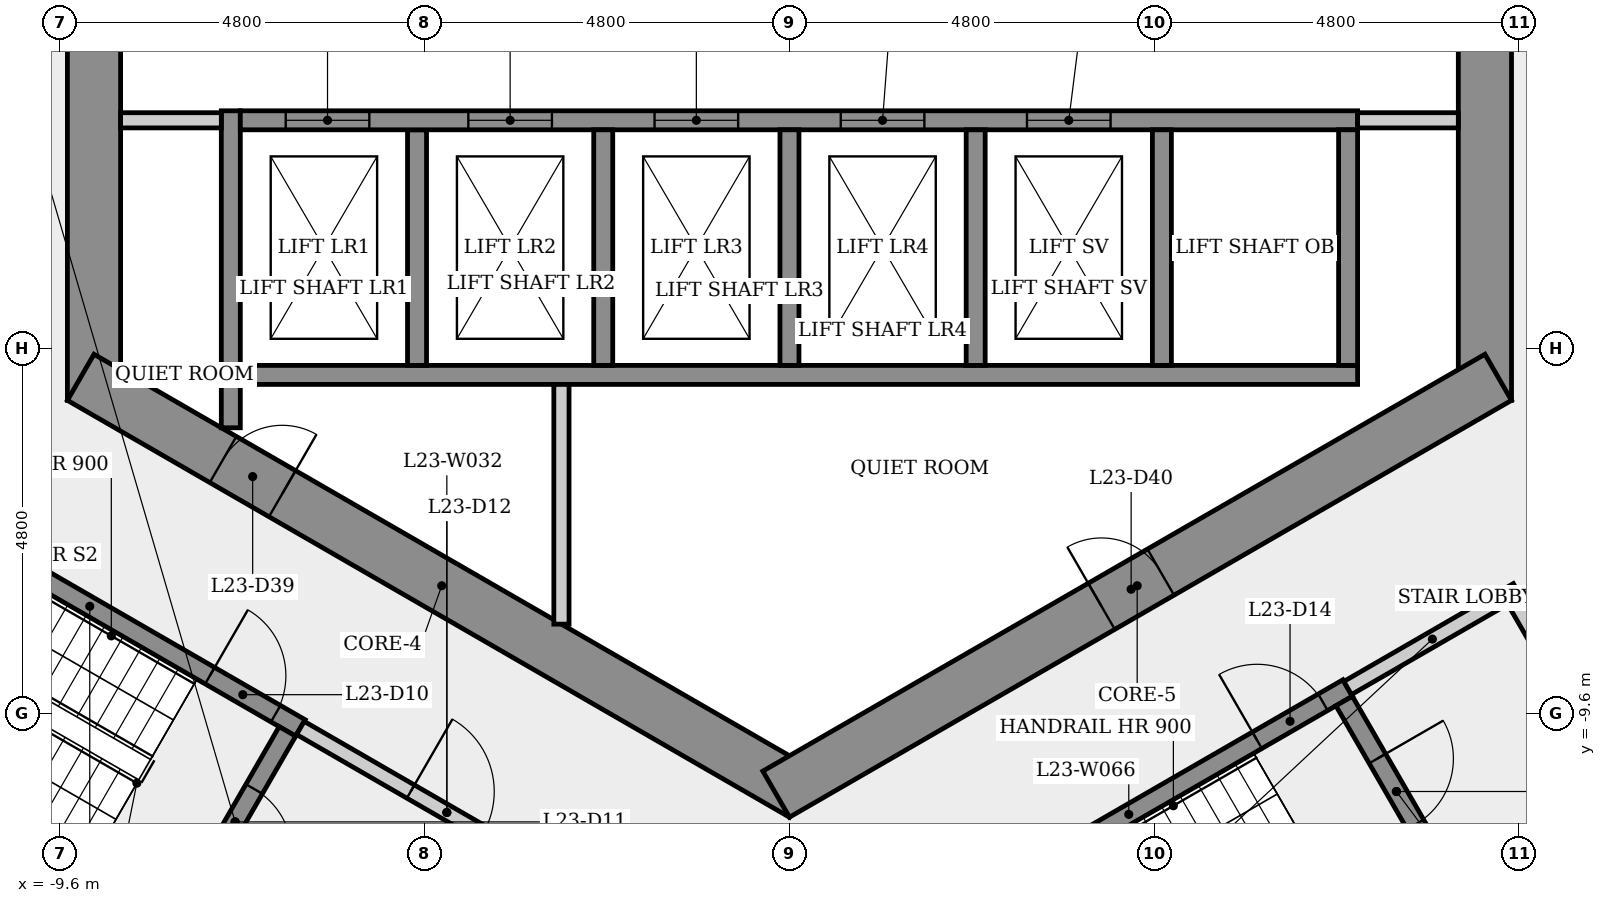
"""IFC4 building model, lengths in metres.
Left out: names, types, materials, properties, quantities, classifications, styles, units other than length and angle.
Written with IfcOpenShell. Run it as: python <this file> out.ifc"""

import sys

from ifc_helpers import new_model, si_unit, direction, frame, frame_2d, origin, place, context, subcontext, project, spatial, rectangle, extrude, element, fill, save


model = new_model("IFC4")
c1 = context("Model", 3, precision=1e-05, world=origin(), true_north=direction((0.0, 1.0)))
c2 = subcontext(c1, "Body", "Model", "MODEL_VIEW")
j1 = project(units=[si_unit("LENGTHUNIT", "METRE"), si_unit("PLANEANGLEUNIT", "RADIAN")], contexts=[c1])
p1 = place(None, origin())
s1 = spatial("IfcSite", under=j1, at=p1, CompositionType="ELEMENT")
p2 = place(p1, origin())
s2 = spatial("IfcBuilding", under=s1, at=p2, CompositionType="ELEMENT")
p3 = place(p2, frame((0.0, 0.0, 89.9)))
s3 = spatial("IfcBuildingStorey", under=s2, at=p3, CompositionType="ELEMENT", Elevation=89.9)
p4 = place(p3, frame((9.15, -5.485, 0.0), z_axis=(0.0, 0.0, 1.0), x_axis=(0.0, 1.0, 0.0)))
e1 = element("IfcWall", 1, at=p4, inside=s3, PredefinedType="SHEAR", context=c2, shape_type="SweptSolid", body=[
    extrude(rectangle(XDim=10.97, YDim=0.7, at=frame_2d((5.485, 0.0))), origin(), (0.0, 0.0, 1.0), 3.4),
])
p5 = place(p4, frame((4.685, 0.0, 0.0)))
e2 = element("IfcOpeningElement", 2, at=p5, cuts=e1, PredefinedType="OPENING", context=c2, shape_type="SweptSolid", body=[
    extrude(rectangle(XDim=1.6, YDim=2.1, at=frame_2d((0.8, 1.05))), frame((0.0, 0.36, 0.0), z_axis=(0.0, -1.0, 0.0), x_axis=(1.0, 0.0, 0.0)), (0.0, 0.0, 1.0), 0.72),
])
p6 = place(p3, frame((-9.15, 5.485, 0.0), z_axis=(0.0, 0.0, 1.0), x_axis=(0.0, -1.0, 0.0)))
e3 = element("IfcWall", 3, at=p6, inside=s3, PredefinedType="SHEAR", context=c2, shape_type="SweptSolid", body=[
    extrude(rectangle(XDim=10.97, YDim=0.7, at=frame_2d((5.485, 0.0))), origin(), (0.0, 0.0, 1.0), 3.4),
])
p7 = place(p6, frame((4.685, 0.0, 0.0)))
e4 = element("IfcOpeningElement", 4, at=p7, cuts=e3, PredefinedType="OPENING", context=c2, shape_type="SweptSolid", body=[
    extrude(rectangle(XDim=1.6, YDim=2.1, at=frame_2d((0.8, 1.05))), frame((0.0, 0.36, 0.0), z_axis=(0.0, -1.0, 0.0), x_axis=(1.0, 0.0, 0.0)), (0.0, 0.0, 1.0), 0.72),
])
p8 = place(p3, frame((-9.325, -5.182, 0.0), z_axis=(0.0, 0.0, 1.0), x_axis=(0.866023993627, -0.500002442456, 0.0)))
e5 = element("IfcWall", 5, at=p8, inside=s3, PredefinedType="SHEAR", context=c2, shape_type="SweptSolid", body=[
    extrude(rectangle(XDim=10.97, YDim=0.7, at=frame_2d((5.485, 0.0))), origin(), (0.0, 0.0, 1.0), 3.4),
])
p9 = place(p8, frame((2.163, 0.0, 0.0)))
e6 = element("IfcOpeningElement", 6, at=p9, cuts=e5, PredefinedType="OPENING", context=c2, shape_type="SweptSolid", body=[
    extrude(rectangle(XDim=0.9, YDim=2.1, at=frame_2d((0.45, 1.05))), frame((0.0, 0.36, 0.0), z_axis=(0.0, -1.0, 0.0), x_axis=(1.0, 0.0, 0.0)), (0.0, 0.0, 1.0), 0.72),
])
p10 = place(p3, frame((-0.175, -10.667, 0.0), z_axis=(0.0, 0.0, 1.0), x_axis=(0.866023993627, 0.500002442456, 0.0)))
e7 = element("IfcWall", 7, at=p10, inside=s3, PredefinedType="SHEAR", context=c2, shape_type="SweptSolid", body=[
    extrude(rectangle(XDim=10.97, YDim=0.7, at=frame_2d((5.485, 0.0))), origin(), (0.0, 0.0, 1.0), 3.4),
])
p11 = place(p10, frame((4.943, 0.0, 0.0)))
e8 = element("IfcOpeningElement", 8, at=p11, cuts=e7, PredefinedType="OPENING", context=c2, shape_type="SweptSolid", body=[
    extrude(rectangle(XDim=0.9, YDim=2.1, at=frame_2d((0.45, 1.05))), frame((0.0, 0.36, 0.0), z_axis=(0.0, -1.0, 0.0), x_axis=(1.0, 0.0, 0.0)), (0.0, 0.0, 1.0), 0.72),
])
p12 = place(p3, frame((-11.977, -6.595, 0.0), z_axis=(0.0, 0.0, 1.0), x_axis=(0.866025499775, -0.499999833739, 0.0)))
e9 = element("IfcWall", 9, at=p12, inside=s3, PredefinedType="SHEAR", context=c2, shape_type="SweptSolid", body=[
    extrude(rectangle(XDim=6.4, YDim=0.25, at=frame_2d((3.2, 0.0))), origin(), (0.0, 0.0, 1.0), 3.05),
])
p13 = place(p12, frame((5.025, 0.0, 0.0)))
e10 = element("IfcOpeningElement", 10, at=p13, cuts=e9, PredefinedType="OPENING", context=c2, shape_type="SweptSolid", body=[
    extrude(rectangle(XDim=1.0, YDim=2.1, at=frame_2d((0.5, 1.05))), frame((0.0, 0.135, 0.0), z_axis=(0.0, -1.0, 0.0), x_axis=(1.0, 0.0, 0.0)), (0.0, 0.0, 1.0), 0.27),
])
p14 = place(p3, frame((-7.935, -12.393, 0.0), z_axis=(0.0, 0.0, 1.0), x_axis=(-0.866025499775, 0.499999833739, 0.0)))
e11 = element("IfcWall", 11, at=p14, inside=s3, PredefinedType="SHEAR", context=c2, shape_type="SweptSolid", body=[
    extrude(rectangle(XDim=6.4, YDim=0.25, at=frame_2d((3.2, 0.0))), origin(), (0.0, 0.0, 1.0), 3.05),
])
p15 = place(p3, frame((-7.35, -5.846, 0.0), z_axis=(0.0, 0.0, 1.0), x_axis=(0.0, 1.0, 0.0)))
e12 = element("IfcWall", 12, at=p15, inside=s3, PredefinedType="SHEAR", context=c2, shape_type="SweptSolid", body=[
    extrude(rectangle(XDim=4.171, YDim=0.25, at=frame_2d((2.085, 0.0))), origin(), (0.0, 0.0, 1.0), 3.05),
])
p16 = place(p3, frame((-7.475, -1.8, 0.0), z_axis=(0.0, 0.0, 1.0), x_axis=(-1.0, 0.0, 0.0)))
e13 = element("IfcWall", 13, at=p16, inside=s3, PredefinedType="PARTITIONING", context=c2, shape_type="SweptSolid", body=[
    extrude(rectangle(XDim=1.325, YDim=0.2, at=frame_2d((0.663, 0.0))), origin(), (0.0, 0.0, 1.0), 3.05),
])
p17 = place(p3, frame((-6.605, -9.841, 0.0), z_axis=(0.0, 0.0, 1.0), x_axis=(-0.499996545922, -0.866027397988, 0.0)))
e14 = element("IfcWall", 14, at=p17, inside=s3, PredefinedType="SHEAR", context=c2, shape_type="SweptSolid", body=[
    extrude(rectangle(XDim=2.75, YDim=0.25, at=frame_2d((1.375, 0.0))), origin(), (0.0, 0.0, 1.0), 3.05),
])
p18 = place(p17, frame((0.875, 0.0, 0.0)))
e15 = element("IfcOpeningElement", 15, at=p18, cuts=e14, PredefinedType="OPENING", context=c2, shape_type="SweptSolid", body=[
    extrude(rectangle(XDim=1.0, YDim=2.1, at=frame_2d((0.5, 1.05))), frame((0.0, 0.135, 0.0), z_axis=(0.0, -1.0, 0.0), x_axis=(1.0, 0.0, 0.0)), (0.0, 0.0, 1.0), 0.27),
])
p19 = place(p3, frame((-6.435, -9.795, 0.0), z_axis=(0.0, 0.0, 1.0), x_axis=(0.866012907634, -0.500021643343, 0.0)))
e16 = element("IfcWall", 16, at=p19, inside=s3, PredefinedType="PARTITIONING", context=c2, shape_type="SweptSolid", body=[
    extrude(rectangle(XDim=4.45, YDim=0.2, at=frame_2d((2.225, 0.0))), origin(), (0.0, 0.0, 1.0), 3.05),
])
p20 = place(p19, frame((1.675, 0.0, 0.0)))
e17 = element("IfcOpeningElement", 17, at=p20, cuts=e16, PredefinedType="OPENING", context=c2, shape_type="SweptSolid", body=[
    extrude(rectangle(XDim=1.1, YDim=2.1, at=frame_2d((0.55, 1.05))), frame((0.0, 0.11, 0.0), z_axis=(0.0, -1.0, 0.0), x_axis=(1.0, 0.0, 0.0)), (0.0, 0.0, 1.0), 0.22),
])
p21 = place(p3, frame((-7.225, -5.15, 0.0), z_axis=(0.0, 0.0, 1.0), x_axis=(1.0, 0.0, 0.0)))
e18 = element("IfcWall", 18, at=p21, inside=s3, PredefinedType="SHEAR", context=c2, shape_type="SweptSolid", body=[
    extrude(rectangle(XDim=14.7, YDim=0.25, at=frame_2d((7.35, 0.0))), origin(), (0.0, 0.0, 1.0), 3.05),
])
p22 = place(p3, frame((-4.9, -1.925, 0.0), z_axis=(0.0, 0.0, 1.0), x_axis=(0.0, -1.0, 0.0)))
e19 = element("IfcWall", 19, at=p22, inside=s3, PredefinedType="SHEAR", context=c2, shape_type="SweptSolid", body=[
    extrude(rectangle(XDim=3.1, YDim=0.25, at=frame_2d((1.55, 0.0))), origin(), (0.0, 0.0, 1.0), 3.4),
])
p23 = place(p3, frame((-7.225, -1.8, 0.0), z_axis=(0.0, 0.0, 1.0), x_axis=(1.0, 0.0, 0.0)))
e20 = element("IfcWall", 20, at=p23, inside=s3, PredefinedType="SHEAR", context=c2, shape_type="SweptSolid", body=[
    extrude(rectangle(XDim=14.7, YDim=0.25, at=frame_2d((7.35, 0.0))), origin(), (0.0, 0.0, 1.0), 3.05),
])
p24 = place(p23, frame((0.597, 0.0, 0.0)))
e21 = element("IfcOpeningElement", 21, at=p24, cuts=e20, PredefinedType="OPENING", context=c2, shape_type="SweptSolid", body=[
    extrude(rectangle(XDim=1.1, YDim=2.1, at=frame_2d((0.55, 1.05))), frame((0.0, 0.135, 0.0), z_axis=(0.0, -1.0, 0.0), x_axis=(1.0, 0.0, 0.0)), (0.0, 0.0, 1.0), 0.27),
])
p25 = place(p23, frame((3.0, 0.0, 0.0)))
e22 = element("IfcOpeningElement", 22, at=p25, cuts=e20, PredefinedType="OPENING", context=c2, shape_type="SweptSolid", body=[
    extrude(rectangle(XDim=1.1, YDim=2.1, at=frame_2d((0.55, 1.05))), frame((0.0, 0.135, 0.0), z_axis=(0.0, -1.0, 0.0), x_axis=(1.0, 0.0, 0.0)), (0.0, 0.0, 1.0), 0.27),
])
p26 = place(p23, frame((5.45, 0.0, 0.0)))
e23 = element("IfcOpeningElement", 23, at=p26, cuts=e20, PredefinedType="OPENING", context=c2, shape_type="SweptSolid", body=[
    extrude(rectangle(XDim=1.1, YDim=2.1, at=frame_2d((0.55, 1.05))), frame((0.0, 0.135, 0.0), z_axis=(0.0, -1.0, 0.0), x_axis=(1.0, 0.0, 0.0)), (0.0, 0.0, 1.0), 0.27),
])
p27 = place(p23, frame((7.9, 0.0, 0.0)))
e24 = element("IfcOpeningElement", 24, at=p27, cuts=e20, PredefinedType="OPENING", context=c2, shape_type="SweptSolid", body=[
    extrude(rectangle(XDim=1.1, YDim=2.1, at=frame_2d((0.55, 1.05))), frame((0.0, 0.135, 0.0), z_axis=(0.0, -1.0, 0.0), x_axis=(1.0, 0.0, 0.0)), (0.0, 0.0, 1.0), 0.27),
])
p28 = place(p23, frame((10.35, 0.0, 0.0)))
e25 = element("IfcOpeningElement", 25, at=p28, cuts=e20, PredefinedType="OPENING", context=c2, shape_type="SweptSolid", body=[
    extrude(rectangle(XDim=1.1, YDim=2.1, at=frame_2d((0.55, 1.05))), frame((0.0, 0.135, 0.0), z_axis=(0.0, -1.0, 0.0), x_axis=(1.0, 0.0, 0.0)), (0.0, 0.0, 1.0), 0.27),
])
p29 = place(p3, frame((-3.0, -5.275, 0.0), z_axis=(0.0, 0.0, 1.0), x_axis=(0.0, -1.0, 0.0)))
e26 = element("IfcWall", 26, at=p29, inside=s3, PredefinedType="PARTITIONING", context=c2, shape_type="SweptSolid", body=[
    extrude(rectangle(XDim=3.154, YDim=0.2, at=frame_2d((1.577, 0.0))), origin(), (0.0, 0.0, 1.0), 3.05),
])
for number, where, z_axis, x_axis in (
    (27, (-2.45, -1.925, 0.0), (0.0, 0.0, 1.0), (0.0, -1.0, 0.0)),
    (28, (0.0, -1.925, 0.0), (0.0, 0.0, 1.0), (0.0, -1.0, 0.0)),
):
    element("IfcWall", number, at=place(p3, frame(where, z_axis=z_axis, x_axis=x_axis)), inside=s3, PredefinedType="SHEAR", context=c2, shape_type="SweptSolid", body=[
        extrude(rectangle(XDim=3.1, YDim=0.25, at=frame_2d((1.55, 0.0))), origin(), (0.0, 0.0, 1.0), 3.4),
    ])
p30 = place(p3, frame((1.585, -12.595, 0.0), z_axis=(0.0, 0.0, 1.0), x_axis=(0.866036417653, 0.499980922934, 0.0)))
e29 = element("IfcWall", 29, at=p30, inside=s3, PredefinedType="SHEAR", context=c2, shape_type="SweptSolid", body=[
    extrude(rectangle(XDim=6.65, YDim=0.25, at=frame_2d((3.325, 0.0))), origin(), (0.0, 0.0, 1.0), 3.05),
])
p31 = place(p30, frame((5.275, 0.0, 0.0)))
e30 = element("IfcOpeningElement", 30, at=p31, cuts=e29, PredefinedType="OPENING", context=c2, shape_type="SweptSolid", body=[
    extrude(rectangle(XDim=1.0, YDim=2.1, at=frame_2d((0.5, 1.05))), frame((0.0, 0.135, 0.0), z_axis=(0.0, -1.0, 0.0), x_axis=(1.0, 0.0, 0.0)), (0.0, 0.0, 1.0), 0.27),
])
for number, where, z_axis, x_axis in (
    (31, (2.45, -1.925, 0.0), (0.0, 0.0, 1.0), (0.0, -1.0, 0.0)),
    (32, (4.9, -1.925, 0.0), (0.0, 0.0, 1.0), (0.0, -1.0, 0.0)),
):
    element("IfcWall", number, at=place(p3, frame(where, z_axis=z_axis, x_axis=x_axis)), inside=s3, PredefinedType="SHEAR", context=c2, shape_type="SweptSolid", body=[
        extrude(rectangle(XDim=3.1, YDim=0.25, at=frame_2d((1.55, 0.0))), origin(), (0.0, 0.0, 1.0), 3.4),
    ])
p32 = place(p3, frame((7.298, -9.441, 0.0), z_axis=(0.0, 0.0, 1.0), x_axis=(0.500034990121, -0.866005201286, 0.0)))
e33 = element("IfcWall", 33, at=p32, inside=s3, PredefinedType="SHEAR", context=c2, shape_type="SweptSolid", body=[
    extrude(rectangle(XDim=2.75, YDim=0.25, at=frame_2d((1.375, 0.0))), origin(), (0.0, 0.0, 1.0), 3.05),
])
p33 = place(p32, frame((0.875, 0.0, 0.0)))
e34 = element("IfcOpeningElement", 34, at=p33, cuts=e33, PredefinedType="OPENING", context=c2, shape_type="SweptSolid", body=[
    extrude(rectangle(XDim=1.0, YDim=2.1, at=frame_2d((0.5, 1.05))), frame((0.0, 0.135, 0.0), z_axis=(0.0, -1.0, 0.0), x_axis=(1.0, 0.0, 0.0)), (0.0, 0.0, 1.0), 0.27),
])
p34 = place(p3, frame((7.344, -9.27, 0.0), z_axis=(0.0, 0.0, 1.0), x_axis=(0.866005588531, 0.500034319456, 0.0)))
e35 = element("IfcWall", 35, at=p34, inside=s3, PredefinedType="PARTITIONING", context=c2, shape_type="SweptSolid", body=[
    extrude(rectangle(XDim=2.575, YDim=0.2, at=frame_2d((1.288, 0.0))), origin(), (0.0, 0.0, 1.0), 3.05),
])
p35 = place(p3, frame((7.35, -1.925, 0.0), z_axis=(0.0, 0.0, 1.0), x_axis=(0.0, -1.0, 0.0)))
e36 = element("IfcWall", 36, at=p35, inside=s3, PredefinedType="SHEAR", context=c2, shape_type="SweptSolid", body=[
    extrude(rectangle(XDim=3.1, YDim=0.25, at=frame_2d((1.55, 0.0))), origin(), (0.0, 0.0, 1.0), 3.4),
])
p36 = place(p3, frame((8.8, -1.8, 0.0), z_axis=(0.0, 0.0, 1.0), x_axis=(-1.0, 0.0, 0.0)))
e37 = element("IfcWall", 37, at=p36, inside=s3, PredefinedType="PARTITIONING", context=c2, shape_type="SweptSolid", body=[
    extrude(rectangle(XDim=1.325, YDim=0.2, at=frame_2d((0.663, 0.0))), origin(), (0.0, 0.0, 1.0), 3.05),
])
p37 = place(p3, frame((9.537, -8.119, 0.0), z_axis=(0.0, 0.0, 1.0), x_axis=(0.499990139034, -0.866031096941, 0.0)))
e38 = element("IfcWall", 38, at=p37, inside=s3, PredefinedType="PARTITIONING", context=c2, shape_type="SweptSolid", body=[
    extrude(rectangle(XDim=3.0, YDim=0.2, at=frame_2d((1.5, 0.0))), origin(), (0.0, 0.0, 1.0), 3.05),
])
p38 = place(p37, frame((0.935, 0.0, 0.0)))
e39 = element("IfcOpeningElement", 39, at=p38, cuts=e38, PredefinedType="OPENING", context=c2, shape_type="SweptSolid", body=[
    extrude(rectangle(XDim=1.0, YDim=2.1, at=frame_2d((0.5, 1.05))), frame((0.0, 0.11, 0.0), z_axis=(0.0, -1.0, 0.0), x_axis=(1.0, 0.0, 0.0)), (0.0, 0.0, 1.0), 0.22),
])
p39 = place(p3, frame((10.901, -10.681, 0.0), z_axis=(0.0, 0.0, 1.0), x_axis=(-0.866007538022, -0.500030943131, 0.0)))
e40 = element("IfcWall", 40, at=p39, inside=s3, PredefinedType="PARTITIONING", context=c2, shape_type="SweptSolid", body=[
    extrude(rectangle(XDim=2.375, YDim=0.2, at=frame_2d((1.188, 0.0))), origin(), (0.0, 0.0, 1.0), 3.05),
])
p40 = place(p24, origin())
e41 = element("IfcDoor", 41, at=p40, inside=s3, OperationType="SLIDING_TO_LEFT", PredefinedType="DOOR", context=c2, shape_type="SweptSolid", body=[
    extrude(rectangle(XDim=1.1, YDim=2.1, at=frame_2d((0.55, 1.05))), frame((0.0, 0.025, 0.0), z_axis=(0.0, -1.0, 0.0), x_axis=(1.0, 0.0, 0.0)), (0.0, 0.0, 1.0), 0.05),
])
fill(e21, e41)
p41 = place(p25, origin())
e42 = element("IfcDoor", 42, at=p41, inside=s3, OperationType="SLIDING_TO_LEFT", PredefinedType="DOOR", context=c2, shape_type="SweptSolid", body=[
    extrude(rectangle(XDim=1.1, YDim=2.1, at=frame_2d((0.55, 1.05))), frame((0.0, 0.025, 0.0), z_axis=(0.0, -1.0, 0.0), x_axis=(1.0, 0.0, 0.0)), (0.0, 0.0, 1.0), 0.05),
])
fill(e22, e42)
p42 = place(p26, origin())
e43 = element("IfcDoor", 43, at=p42, inside=s3, OperationType="SLIDING_TO_LEFT", PredefinedType="DOOR", context=c2, shape_type="SweptSolid", body=[
    extrude(rectangle(XDim=1.1, YDim=2.1, at=frame_2d((0.55, 1.05))), frame((0.0, 0.025, 0.0), z_axis=(0.0, -1.0, 0.0), x_axis=(1.0, 0.0, 0.0)), (0.0, 0.0, 1.0), 0.05),
])
fill(e23, e43)
p43 = place(p27, origin())
e44 = element("IfcDoor", 44, at=p43, inside=s3, OperationType="SLIDING_TO_LEFT", PredefinedType="DOOR", context=c2, shape_type="SweptSolid", body=[
    extrude(rectangle(XDim=1.1, YDim=2.1, at=frame_2d((0.55, 1.05))), frame((0.0, 0.025, 0.0), z_axis=(0.0, -1.0, 0.0), x_axis=(1.0, 0.0, 0.0)), (0.0, 0.0, 1.0), 0.05),
])
fill(e24, e44)
p44 = place(p28, origin())
e45 = element("IfcDoor", 45, at=p44, inside=s3, OperationType="SLIDING_TO_LEFT", PredefinedType="DOOR", context=c2, shape_type="SweptSolid", body=[
    extrude(rectangle(XDim=1.1, YDim=2.1, at=frame_2d((0.55, 1.05))), frame((0.0, 0.025, 0.0), z_axis=(0.0, -1.0, 0.0), x_axis=(1.0, 0.0, 0.0)), (0.0, 0.0, 1.0), 0.05),
])
fill(e25, e45)
p45 = place(p13, origin())
e46 = element("IfcDoor", 46, at=p45, inside=s3, OperationType="SINGLE_SWING_LEFT", PredefinedType="DOOR", context=c2, shape_type="SweptSolid", body=[
    extrude(rectangle(XDim=1.0, YDim=2.1, at=frame_2d((0.5, 1.05))), frame((0.0, 0.025, 0.0), z_axis=(0.0, -1.0, 0.0), x_axis=(1.0, 0.0, 0.0)), (0.0, 0.0, 1.0), 0.05),
])
fill(e10, e46)
p46 = place(p18, origin())
e47 = element("IfcDoor", 47, at=p46, inside=s3, OperationType="SINGLE_SWING_RIGHT", PredefinedType="DOOR", context=c2, shape_type="SweptSolid", body=[
    extrude(rectangle(XDim=1.0, YDim=2.1, at=frame_2d((0.5, 1.05))), frame((0.0, 0.025, 0.0), z_axis=(0.0, -1.0, 0.0), x_axis=(1.0, 0.0, 0.0)), (0.0, 0.0, 1.0), 0.05),
])
fill(e15, e47)
p47 = place(p20, origin())
e48 = element("IfcDoor", 48, at=p47, inside=s3, OperationType="SINGLE_SWING_LEFT", PredefinedType="DOOR", context=c2, shape_type="SweptSolid", body=[
    extrude(rectangle(XDim=1.1, YDim=2.1, at=frame_2d((0.55, 1.05))), frame((0.0, 0.025, 0.0), z_axis=(0.0, -1.0, 0.0), x_axis=(1.0, 0.0, 0.0)), (0.0, 0.0, 1.0), 0.05),
])
fill(e17, e48)
p48 = place(p31, origin())
e49 = element("IfcDoor", 49, at=p48, inside=s3, OperationType="SINGLE_SWING_LEFT", PredefinedType="DOOR", context=c2, shape_type="SweptSolid", body=[
    extrude(rectangle(XDim=1.0, YDim=2.1, at=frame_2d((0.5, 1.05))), frame((0.0, 0.025, 0.0), z_axis=(0.0, -1.0, 0.0), x_axis=(1.0, 0.0, 0.0)), (0.0, 0.0, 1.0), 0.05),
])
fill(e30, e49)
p49 = place(p33, origin())
e50 = element("IfcDoor", 50, at=p49, inside=s3, OperationType="SINGLE_SWING_LEFT", PredefinedType="DOOR", context=c2, shape_type="SweptSolid", body=[
    extrude(rectangle(XDim=1.0, YDim=2.1, at=frame_2d((0.5, 1.05))), frame((0.0, 0.025, 0.0), z_axis=(0.0, -1.0, 0.0), x_axis=(1.0, 0.0, 0.0)), (0.0, 0.0, 1.0), 0.05),
])
fill(e34, e50)
p50 = place(p9, origin())
e51 = element("IfcDoor", 51, at=p50, inside=s3, OperationType="SINGLE_SWING_RIGHT", PredefinedType="DOOR", context=c2, shape_type="SweptSolid", body=[
    extrude(rectangle(XDim=0.9, YDim=2.1, at=frame_2d((0.45, 1.05))), frame((0.0, 0.025, 0.0), z_axis=(0.0, -1.0, 0.0), x_axis=(1.0, 0.0, 0.0)), (0.0, 0.0, 1.0), 0.05),
])
fill(e6, e51)
p51 = place(p11, origin())
e52 = element("IfcDoor", 52, at=p51, inside=s3, OperationType="SINGLE_SWING_LEFT", PredefinedType="DOOR", context=c2, shape_type="SweptSolid", body=[
    extrude(rectangle(XDim=0.9, YDim=2.1, at=frame_2d((0.45, 1.05))), frame((0.0, 0.025, 0.0), z_axis=(0.0, -1.0, 0.0), x_axis=(1.0, 0.0, 0.0)), (0.0, 0.0, 1.0), 0.05),
])
fill(e8, e52)
save(model, sys.argv[1])
